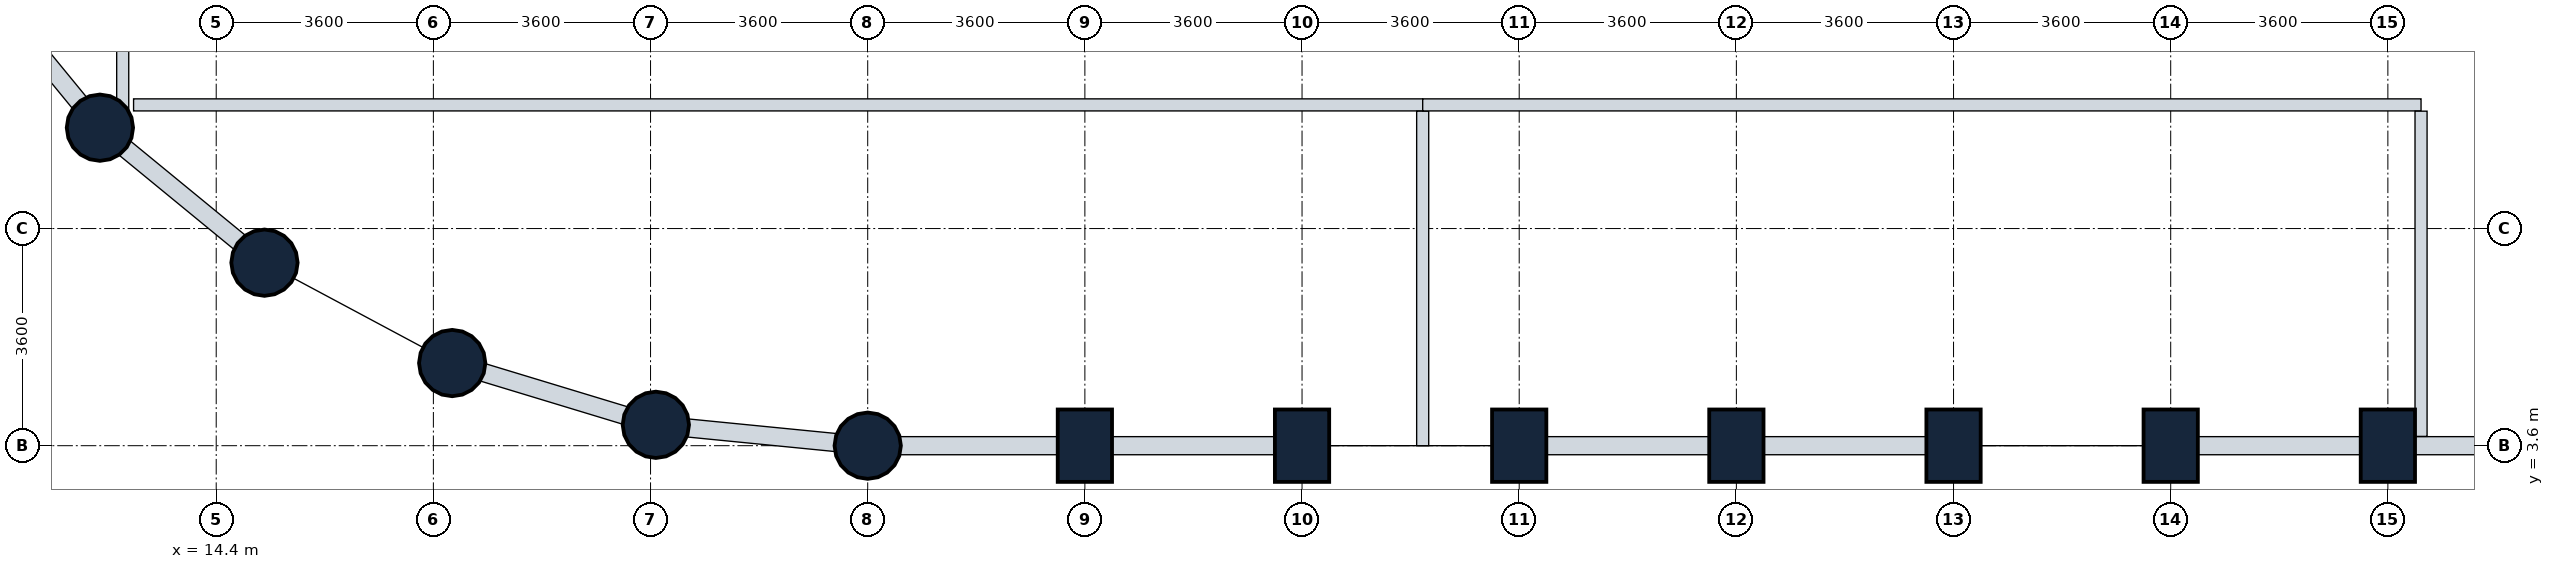
"""IFC4 building model, lengths in metres.
Left out: names, types, materials, properties, quantities, classifications, styles, units other than length and angle.
Written with IfcOpenShell. Run it as: python <this file> out.ifc"""

import sys

from ifc_helpers import new_model, si_unit, direction, frame, frame_2d, origin, origin_2d, place, context, subcontext, project, spatial, rectangle, circle, extrude, element, fill, save


model = new_model("IFC4")
c1 = context("Model", 3, precision=1e-05, world=origin(), true_north=direction((0.0, 1.0)))
c2 = subcontext(c1, "Body", "Model", "MODEL_VIEW")
j1 = project(units=[si_unit("LENGTHUNIT", "METRE"), si_unit("PLANEANGLEUNIT", "RADIAN")], contexts=[c1])
p1 = place(None, origin())
s1 = spatial("IfcSite", under=j1, at=p1, CompositionType="ELEMENT")
p2 = place(p1, origin())
s2 = spatial("IfcBuilding", under=s1, at=p2, CompositionType="ELEMENT")
p3 = place(p2, frame((0.0, 0.0, 74.7)))
s3 = spatial("IfcBuildingStorey", under=s2, at=p3, CompositionType="ELEMENT", Elevation=74.7)
for number, where, z_axis, x_axis in (
    (1, (12.472, 8.872, 0.0), (0.0, 0.0, 1.0), (1.0, 0.0, 0.0)),
    (2, (15.2, 6.634, 0.0), (0.0, 0.0, 1.0), (1.0, 0.0, 0.0)),
    (3, (18.312, 4.97, 0.0), (0.0, 0.0, 1.0), (1.0, 0.0, 0.0)),
    (4, (21.688, 3.946, 0.0), (0.0, 0.0, 1.0), (1.0, 0.0, 0.0)),
    (5, (25.2, 3.6, 0.0), (0.0, 0.0, 1.0), (1.0, 0.0, 0.0)),
):
    element("IfcColumn", number, at=place(p3, frame(where, z_axis=z_axis, x_axis=x_axis)), inside=s3, PredefinedType="COLUMN", context=c2, shape_type="SweptSolid", body=[
        extrude(circle(Radius=0.55, at=origin_2d()), origin(), (0.0, 0.0, 1.0), 5.4),
    ])
for number, where, z_axis, x_axis in (
    (6, (28.8, 3.6, 0.0), (0.0, 0.0, 1.0), (1.0, 0.0, 0.0)),
    (7, (32.4, 3.6, 0.0), (0.0, 0.0, 1.0), (1.0, 0.0, 0.0)),
    (8, (36.0, 3.6, 0.0), (0.0, 0.0, 1.0), (1.0, 0.0, 0.0)),
    (9, (39.6, 3.6, 0.0), (0.0, 0.0, 1.0), (1.0, 0.0, 0.0)),
    (10, (43.2, 3.6, 0.0), (0.0, 0.0, 1.0), (1.0, 0.0, 0.0)),
    (11, (46.8, 3.6, 0.0), (0.0, 0.0, 1.0), (1.0, 0.0, 0.0)),
    (12, (50.4, 3.6, 0.0), (0.0, 0.0, 1.0), (1.0, 0.0, 0.0)),
):
    element("IfcColumn", number, at=place(p3, frame(where, z_axis=z_axis, x_axis=x_axis)), inside=s3, PredefinedType="COLUMN", context=c2, shape_type="SweptSolid", body=[
        extrude(rectangle(XDim=0.9, YDim=1.2, at=origin_2d()), origin(), (0.0, 0.0, 1.0), 5.4),
    ])
p4 = place(p3, frame((28.8, 3.6, 0.0), z_axis=(0.0, 0.0, 1.0), x_axis=(-1.0, 0.0, 0.0)))
e13 = element("IfcWall", 13, at=p4, inside=s3, PredefinedType="STANDARD", context=c2, shape_type="SweptSolid", body=[
    extrude(rectangle(XDim=3.6, YDim=0.3, at=frame_2d((1.8, 0.0))), origin(), (0.0, 0.0, 1.0), 4.43),
])
p5 = place(p3, frame((32.4, 3.6, 0.0), z_axis=(0.0, 0.0, 1.0), x_axis=(-1.0, 0.0, 0.0)))
e14 = element("IfcWall", 14, at=p5, inside=s3, PredefinedType="STANDARD", context=c2, shape_type="SweptSolid", body=[
    extrude(rectangle(XDim=3.6, YDim=0.3, at=frame_2d((1.8, 0.0))), origin(), (0.0, 0.0, 1.0), 4.43),
])
p6 = place(p3, frame((39.6, 3.6, 0.0), z_axis=(0.0, 0.0, 1.0), x_axis=(-1.0, 0.0, 0.0)))
e15 = element("IfcWall", 15, at=p6, inside=s3, PredefinedType="STANDARD", context=c2, shape_type="SweptSolid", body=[
    extrude(rectangle(XDim=3.6, YDim=0.3, at=frame_2d((1.8, 0.0))), origin(), (0.0, 0.0, 1.0), 4.43),
])
for number, where, z_axis, x_axis in (
    (16, (43.2, 3.6, 0.0), (0.0, 0.0, 1.0), (-1.0, 0.0, 0.0)),
    (17, (50.4, 3.6, 0.0), (0.0, 0.0, 1.0), (-1.0, 0.0, 0.0)),
):
    element("IfcWall", number, at=place(p3, frame(where, z_axis=z_axis, x_axis=x_axis)), inside=s3, PredefinedType="STANDARD", context=c2, shape_type="SweptSolid", body=[
        extrude(rectangle(XDim=3.6, YDim=0.3, at=frame_2d((1.8, 0.0))), origin(), (0.0, 0.0, 1.0), 4.43),
    ])
p7 = place(p3, frame((54.0, 3.6, 0.0), z_axis=(0.0, 0.0, 1.0), x_axis=(-1.0, 0.0, 0.0)))
e18 = element("IfcWall", 18, at=p7, inside=s3, PredefinedType="STANDARD", context=c2, shape_type="SweptSolid", body=[
    extrude(rectangle(XDim=3.6, YDim=0.3, at=frame_2d((1.8, 0.0))), origin(), (0.0, 0.0, 1.0), 4.43),
])
for number, where, z_axis, x_axis in (
    (19, (12.472, 8.872, 0.0), (0.0, 0.0, 1.0), (-0.634, 0.773, 0.0)),
    (20, (15.2, 6.634, 0.0), (0.0, 0.0, 1.0), (-0.773, 0.634, 0.0)),
):
    element("IfcWall", number, at=place(p3, frame(where, z_axis=z_axis, x_axis=x_axis)), inside=s3, PredefinedType="STANDARD", context=c2, shape_type="SweptSolid", body=[
        extrude(rectangle(XDim=3.529, YDim=0.3, at=frame_2d((1.764, 0.0))), origin(), (0.0, 0.0, 1.0), 4.43),
    ])
p8 = place(p3, frame((21.688, 3.946, 0.0), z_axis=(0.0, 0.0, 1.0), x_axis=(-0.956953367403, 0.290241714123, 0.0)))
e21 = element("IfcWall", 21, at=p8, inside=s3, PredefinedType="STANDARD", context=c2, shape_type="SweptSolid", body=[
    extrude(rectangle(XDim=3.528, YDim=0.3, at=frame_2d((1.764, 0.0))), origin(), (0.0, 0.0, 1.0), 4.43),
])
p9 = place(p3, frame((25.2, 3.6, 0.0), z_axis=(0.0, 0.0, 1.0), x_axis=(-0.995183369056, 0.098030923459, 0.0)))
e22 = element("IfcWall", 22, at=p9, inside=s3, PredefinedType="STANDARD", context=c2, shape_type="SweptSolid", body=[
    extrude(rectangle(XDim=3.529, YDim=0.3, at=frame_2d((1.765, 0.0))), origin(), (0.0, 0.0, 1.0), 4.43),
])
p10 = place(p3, frame((12.85, 8.716, 0.0), z_axis=(0.0, 0.0, 1.0), x_axis=(0.0, 1.0, 0.0)))
e23 = element("IfcWall", 23, at=p10, inside=s3, PredefinedType="PARTITIONING", context=c2, shape_type="SweptSolid", body=[
    extrude(rectangle(XDim=16.484, YDim=0.2, at=frame_2d((8.242, 0.0))), origin(), (0.0, 0.0, 1.0), 4.43),
])
p11 = place(p10, frame((7.565, 0.0, 0.0)))
e24 = element("IfcOpeningElement", 24, at=p11, cuts=e23, PredefinedType="OPENING", context=c2, shape_type="SweptSolid", body=[
    extrude(rectangle(XDim=1.2, YDim=2.1, at=frame_2d((0.6, 1.05))), frame((0.0, 0.11, 0.0), z_axis=(0.0, -1.0, 0.0), x_axis=(1.0, 0.0, 0.0)), (0.0, 0.0, 1.0), 0.22),
])
p12 = place(p3, frame((13.03, 9.25, 0.0), z_axis=(0.0, 0.0, 1.0), x_axis=(1.0, 0.0, 0.0)))
e25 = element("IfcWall", 25, at=p12, inside=s3, PredefinedType="PARTITIONING", context=c2, shape_type="SweptSolid", body=[
    extrude(rectangle(XDim=21.37, YDim=0.2, at=frame_2d((10.685, 0.0))), origin(), (0.0, 0.0, 1.0), 4.61),
])
p13 = place(p12, frame((11.248, 0.0, 0.0)))
e26 = element("IfcOpeningElement", 26, at=p13, cuts=e25, PredefinedType="OPENING", context=c2, shape_type="SweptSolid", body=[
    extrude(rectangle(XDim=1.2, YDim=2.1, at=frame_2d((0.6, 1.05))), frame((0.0, 0.11, 0.0), z_axis=(0.0, -1.0, 0.0), x_axis=(1.0, 0.0, 0.0)), (0.0, 0.0, 1.0), 0.22),
])
p14 = place(p3, frame((34.4, 3.6, 0.0), z_axis=(0.0, 0.0, 1.0), x_axis=(0.0, 1.0, 0.0)))
e27 = element("IfcWall", 27, at=p14, inside=s3, PredefinedType="PARTITIONING", context=c2, shape_type="SweptSolid", body=[
    extrude(rectangle(XDim=5.546, YDim=0.2, at=frame_2d((2.773, 0.0))), origin(), (0.0, 0.0, 1.0), 4.43),
])
p15 = place(p3, frame((34.4, 9.25, 0.0), z_axis=(0.0, 0.0, 1.0), x_axis=(1.0, 0.0, 0.0)))
e28 = element("IfcWall", 28, at=p15, inside=s3, PredefinedType="PARTITIONING", context=c2, shape_type="SweptSolid", body=[
    extrude(rectangle(XDim=16.55, YDim=0.2, at=frame_2d((8.275, 0.0))), origin(), (0.0, 0.0, 1.0), 4.61),
])
p16 = place(p15, frame((7.415, 0.0, 0.0)))
e29 = element("IfcOpeningElement", 29, at=p16, cuts=e28, PredefinedType="OPENING", context=c2, shape_type="SweptSolid", body=[
    extrude(rectangle(XDim=1.8, YDim=2.2, at=frame_2d((0.9, 1.1))), frame((0.0, 0.11, 0.0), z_axis=(0.0, -1.0, 0.0), x_axis=(1.0, 0.0, 0.0)), (0.0, 0.0, 1.0), 0.22),
])
p17 = place(p3, frame((50.95, 3.754, 0.0), z_axis=(0.0, 0.0, 1.0), x_axis=(0.0, 1.0, 0.0)))
e30 = element("IfcWall", 30, at=p17, inside=s3, PredefinedType="PARTITIONING", context=c2, shape_type="SweptSolid", body=[
    extrude(rectangle(XDim=5.392, YDim=0.2, at=frame_2d((2.696, 0.0))), origin(), (0.0, 0.0, 1.0), 4.43),
])
p18 = place(p13, origin())
e31 = element("IfcDoor", 31, at=p18, inside=s3, OperationType="SINGLE_SWING_RIGHT", PredefinedType="DOOR", context=c2, shape_type="SweptSolid", body=[
    extrude(rectangle(XDim=1.2, YDim=2.1, at=frame_2d((0.6, 1.05))), frame((0.0, 0.025, 0.0), z_axis=(0.0, -1.0, 0.0), x_axis=(1.0, 0.0, 0.0)), (0.0, 0.0, 1.0), 0.05),
])
fill(e26, e31)
p19 = place(p16, origin())
e32 = element("IfcDoor", 32, at=p19, inside=s3, OperationType="DOUBLE_DOOR_SINGLE_SWING", PredefinedType="DOOR", context=c2, shape_type="SweptSolid", body=[
    extrude(rectangle(XDim=1.8, YDim=2.2, at=frame_2d((0.9, 1.1))), frame((0.0, 0.025, 0.0), z_axis=(0.0, -1.0, 0.0), x_axis=(1.0, 0.0, 0.0)), (0.0, 0.0, 1.0), 0.05),
])
fill(e29, e32)
save(model, sys.argv[1])
